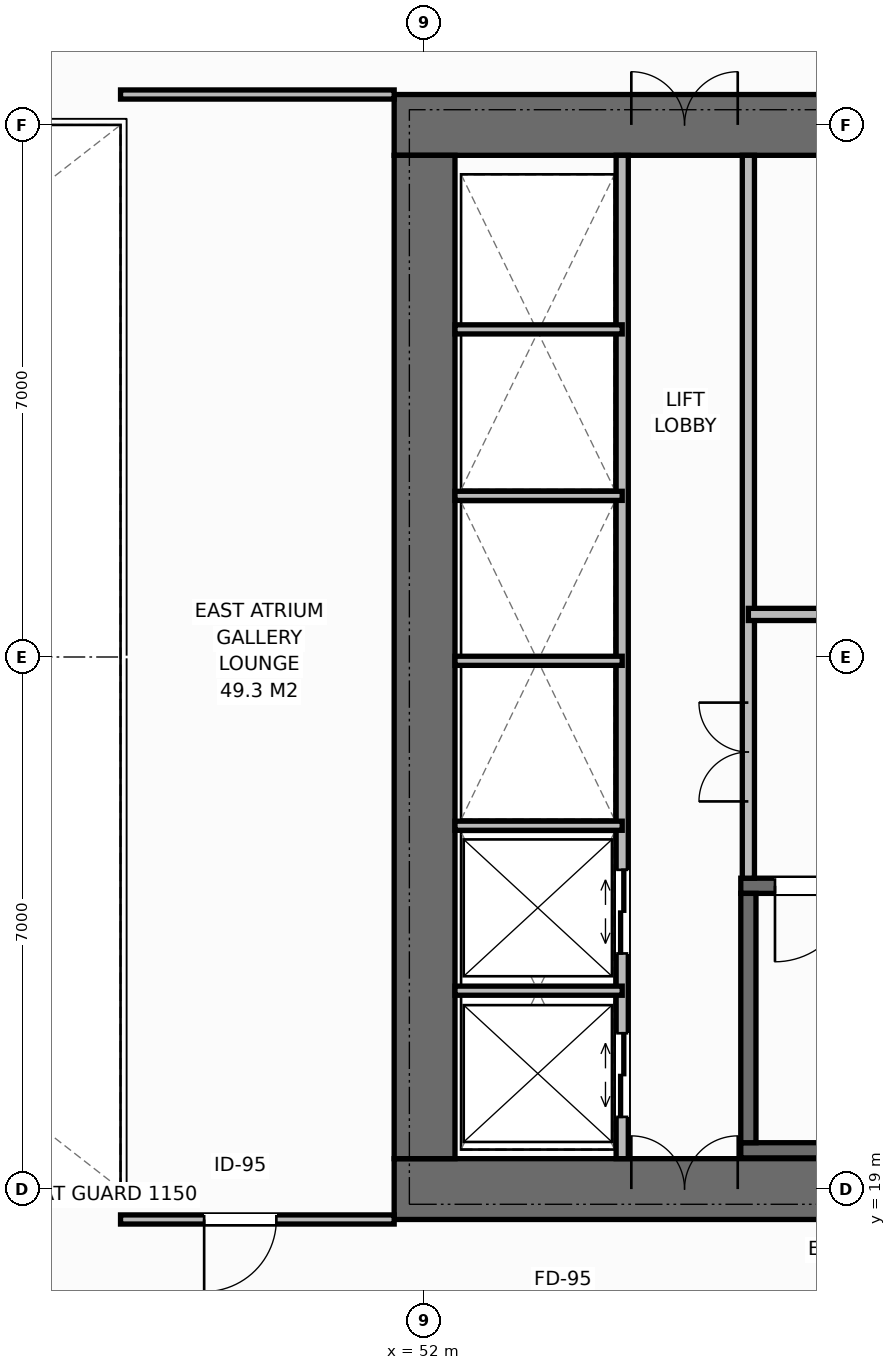
"""IFC4 building model, lengths in metres.
Left out: names, types, materials, properties, quantities, classifications, styles, units other than length and angle.
Written with IfcOpenShell. Run it as: python <this file> out.ifc"""

import sys

from ifc_helpers import new_model, si_unit, direction, frame, frame_2d, origin, place, context, subcontext, project, spatial, rectangle, extrude, element, fill, save


model = new_model("IFC4")
c1 = context("Model", 3, precision=1e-05, world=origin(), true_north=direction((0.0, 1.0)))
c2 = subcontext(c1, "Body", "Model", "MODEL_VIEW")
j1 = project(units=[si_unit("LENGTHUNIT", "METRE"), si_unit("PLANEANGLEUNIT", "RADIAN")], contexts=[c1])
p1 = place(None, origin())
s1 = spatial("IfcSite", under=j1, at=p1, CompositionType="ELEMENT")
p2 = place(p1, origin())
s2 = spatial("IfcBuilding", under=s1, at=p2, CompositionType="ELEMENT")
p3 = place(p2, frame((0.0, 0.0, 35.4)))
s3 = spatial("IfcBuildingStorey", under=s2, at=p3, CompositionType="ELEMENT", Elevation=35.4)
p4 = place(p3, frame((51.6, 19.0, 0.0), z_axis=(0.0, 0.0, 1.0), x_axis=(1.0, 0.0, 0.0)))
e1 = element("IfcWall", 1, at=p4, inside=s3, PredefinedType="SHEAR", context=c2, shape_type="SweptSolid", body=[
    extrude(rectangle(XDim=13.8, YDim=0.8, at=frame_2d((6.9, 0.0))), origin(), (0.0, 0.0, 1.0), 3.8),
])
p5 = place(p4, frame((3.12, 0.0, 0.0)))
e2 = element("IfcOpeningElement", 2, at=p5, cuts=e1, PredefinedType="OPENING", context=c2, shape_type="SweptSolid", body=[
    extrude(rectangle(XDim=1.4, YDim=2.2, at=frame_2d((0.7, 1.1))), frame((0.0, 0.41, 0.0), z_axis=(0.0, -1.0, 0.0), x_axis=(1.0, 0.0, 0.0)), (0.0, 0.0, 1.0), 0.82),
])
p6 = place(p3, frame((51.6, 33.0, 0.0), z_axis=(0.0, 0.0, 1.0), x_axis=(1.0, 0.0, 0.0)))
e3 = element("IfcWall", 3, at=p6, inside=s3, PredefinedType="SHEAR", context=c2, shape_type="SweptSolid", body=[
    extrude(rectangle(XDim=13.8, YDim=0.8, at=frame_2d((6.9, 0.0))), origin(), (0.0, 0.0, 1.0), 3.8),
])
p7 = place(p6, frame((3.12, 0.0, 0.0)))
e4 = element("IfcOpeningElement", 4, at=p7, cuts=e3, PredefinedType="OPENING", context=c2, shape_type="SweptSolid", body=[
    extrude(rectangle(XDim=1.4, YDim=2.2, at=frame_2d((0.7, 1.1))), frame((0.0, 0.41, 0.0), z_axis=(0.0, -1.0, 0.0), x_axis=(1.0, 0.0, 0.0)), (0.0, 0.0, 1.0), 0.82),
])
p8 = place(p6, frame((11.0, 0.0, 0.0)))
e5 = element("IfcOpeningElement", 5, at=p8, cuts=e3, PredefinedType="OPENING", context=c2, shape_type="SweptSolid", body=[
    extrude(rectangle(XDim=0.9, YDim=2.15, at=frame_2d((0.45, 1.075))), frame((0.0, 0.41, 0.0), z_axis=(0.0, -1.0, 0.0), x_axis=(1.0, 0.0, 0.0)), (0.0, 0.0, 1.0), 0.82),
])
p9 = place(p6, frame((5.95, 0.0, 0.0)))
e6 = element("IfcOpeningElement", 6, at=p9, cuts=e3, PredefinedType="OPENING", context=c2, shape_type="SweptSolid", body=[
    extrude(rectangle(XDim=0.9, YDim=2.15, at=frame_2d((0.45, 1.075))), frame((0.0, 0.41, 0.0), z_axis=(0.0, -1.0, 0.0), x_axis=(1.0, 0.0, 0.0)), (0.0, 0.0, 1.0), 0.82),
])
p10 = place(p6, frame((8.35, 0.0, 0.0)))
e7 = element("IfcOpeningElement", 7, at=p10, cuts=e3, PredefinedType="OPENING", context=c2, shape_type="SweptSolid", body=[
    extrude(rectangle(XDim=0.95, YDim=2.15, at=frame_2d((0.475, 1.075))), frame((0.0, 0.41, 0.0), z_axis=(0.0, -1.0, 0.0), x_axis=(1.0, 0.0, 0.0)), (0.0, 0.0, 1.0), 0.82),
])
p11 = place(p3, frame((52.0, 19.4, 0.0), z_axis=(0.0, 0.0, 1.0), x_axis=(0.0, 1.0, 0.0)))
e8 = element("IfcWall", 8, at=p11, inside=s3, PredefinedType="SHEAR", context=c2, shape_type="SweptSolid", body=[
    extrude(rectangle(XDim=13.2, YDim=0.8, at=frame_2d((6.6, 0.0))), origin(), (0.0, 0.0, 1.0), 3.8),
])
p12 = place(p3, frame((56.16, 19.51, 0.0), z_axis=(0.0, 0.0, 1.0), x_axis=(1.0, 0.0, 0.0)))
e9 = element("IfcWall", 9, at=p12, inside=s3, PredefinedType="SHEAR", context=c2, shape_type="SweptSolid", body=[
    extrude(rectangle(XDim=8.43, YDim=0.2, at=frame_2d((4.215, 0.0))), origin(), (0.0, 0.0, 1.0), 3.8),
])
p13 = place(p3, frame((56.16, 22.99, 0.0), z_axis=(0.0, 0.0, 1.0), x_axis=(1.0, 0.0, 0.0)))
e10 = element("IfcWall", 10, at=p13, inside=s3, PredefinedType="SHEAR", context=c2, shape_type="SweptSolid", body=[
    extrude(rectangle(XDim=8.43, YDim=0.2, at=frame_2d((4.215, 0.0))), origin(), (0.0, 0.0, 1.0), 3.8),
])
p14 = place(p13, frame((0.45, 0.0, 0.0)))
e11 = element("IfcOpeningElement", 11, at=p14, cuts=e10, PredefinedType="OPENING", context=c2, shape_type="SweptSolid", body=[
    extrude(rectangle(XDim=1.0, YDim=2.15, at=frame_2d((0.5, 1.075))), frame((0.0, 0.11, 0.0), z_axis=(0.0, -1.0, 0.0), x_axis=(1.0, 0.0, 0.0)), (0.0, 0.0, 1.0), 0.22),
])
p15 = place(p3, frame((56.26, 19.61, 0.0), z_axis=(0.0, 0.0, 1.0), x_axis=(0.0, 1.0, 0.0)))
e12 = element("IfcWall", 12, at=p15, inside=s3, PredefinedType="SHEAR", context=c2, shape_type="SweptSolid", body=[
    extrude(rectangle(XDim=3.28, YDim=0.2, at=frame_2d((1.64, 0.0))), origin(), (0.0, 0.0, 1.0), 3.8),
])
p16 = place(p3, frame((54.6, 19.4, 0.0), z_axis=(0.0, 0.0, 1.0), x_axis=(0.0, 1.0, 0.0)))
e13 = element("IfcWall", 13, at=p16, inside=s3, PredefinedType="STANDARD", context=c2, shape_type="SweptSolid", body=[
    extrude(rectangle(XDim=13.2, YDim=0.16, at=frame_2d((6.6, 0.0))), origin(), (0.0, 0.0, 1.0), 3.55),
])
p17 = place(p16, frame((0.55, 0.0, 0.0)))
e14 = element("IfcOpeningElement", 14, at=p17, cuts=e13, PredefinedType="OPENING", context=c2, shape_type="SweptSolid", body=[
    extrude(rectangle(XDim=1.1, YDim=2.2, at=frame_2d((0.55, 1.1))), frame((0.0, 0.09, 0.0), z_axis=(0.0, -1.0, 0.0), x_axis=(1.0, 0.0, 0.0)), (0.0, 0.0, 1.0), 0.18),
])
p18 = place(p16, frame((2.7, 0.0, 0.0)))
e15 = element("IfcOpeningElement", 15, at=p18, cuts=e13, PredefinedType="OPENING", context=c2, shape_type="SweptSolid", body=[
    extrude(rectangle(XDim=1.1, YDim=2.2, at=frame_2d((0.55, 1.1))), frame((0.0, 0.09, 0.0), z_axis=(0.0, -1.0, 0.0), x_axis=(1.0, 0.0, 0.0)), (0.0, 0.0, 1.0), 0.18),
])
p19 = place(p3, frame((56.26, 23.09, 0.0), z_axis=(0.0, 0.0, 1.0), x_axis=(0.0, 1.0, 0.0)))
e16 = element("IfcWall", 16, at=p19, inside=s3, PredefinedType="STANDARD", context=c2, shape_type="SweptSolid", body=[
    extrude(rectangle(XDim=9.51, YDim=0.16, at=frame_2d((4.755, 0.0))), origin(), (0.0, 0.0, 1.0), 3.55),
])
p20 = place(p19, frame((1.01, 0.0, 0.0)))
e17 = element("IfcOpeningElement", 17, at=p20, cuts=e16, PredefinedType="OPENING", context=c2, shape_type="SweptSolid", body=[
    extrude(rectangle(XDim=1.3, YDim=2.2, at=frame_2d((0.65, 1.1))), frame((0.0, 0.09, 0.0), z_axis=(0.0, -1.0, 0.0), x_axis=(1.0, 0.0, 0.0)), (0.0, 0.0, 1.0), 0.18),
])
for number, where, z_axis, x_axis in (
    (18, (52.4, 21.61, 0.0), (0.0, 0.0, 1.0), (1.0, 0.0, 0.0)),
    (19, (52.4, 23.78, 0.0), (0.0, 0.0, 1.0), (1.0, 0.0, 0.0)),
    (20, (52.4, 25.95, 0.0), (0.0, 0.0, 1.0), (1.0, 0.0, 0.0)),
    (21, (52.4, 28.12, 0.0), (0.0, 0.0, 1.0), (1.0, 0.0, 0.0)),
    (22, (52.4, 30.31, 0.0), (0.0, 0.0, 1.0), (1.0, 0.0, 0.0)),
):
    element("IfcWall", number, at=place(p3, frame(where, z_axis=z_axis, x_axis=x_axis)), inside=s3, PredefinedType="PARTITIONING", context=c2, shape_type="SweptSolid", body=[
        extrude(rectangle(XDim=2.2, YDim=0.12, at=frame_2d((1.1, 0.0))), origin(), (0.0, 0.0, 1.0), 3.55),
    ])
p21 = place(p3, frame((56.26, 26.56, 0.0), z_axis=(0.0, 0.0, 1.0), x_axis=(1.0, 0.0, 0.0)))
e23 = element("IfcWall", 23, at=p21, inside=s3, PredefinedType="STANDARD", context=c2, shape_type="SweptSolid", body=[
    extrude(rectangle(XDim=8.34, YDim=0.16, at=frame_2d((4.17, 0.0))), origin(), (0.0, 0.0, 1.0), 3.55),
])
p22 = place(p3, frame((48.0, 33.4, 0.0), z_axis=(0.0, 0.0, 1.0), x_axis=(1.0, 0.0, 0.0)))
e24 = element("IfcWall", 24, at=p22, inside=s3, PredefinedType="PARTITIONING", context=c2, shape_type="SweptSolid", body=[
    extrude(rectangle(XDim=3.6, YDim=0.12, at=frame_2d((1.8, 0.0))), origin(), (0.0, 0.0, 1.0), 3.55),
])
p23 = place(p3, frame((48.0, 18.6, 0.0), z_axis=(0.0, 0.0, 1.0), x_axis=(1.0, 0.0, 0.0)))
e25 = element("IfcWall", 25, at=p23, inside=s3, PredefinedType="PARTITIONING", context=c2, shape_type="SweptSolid", body=[
    extrude(rectangle(XDim=3.6, YDim=0.12, at=frame_2d((1.8, 0.0))), origin(), (0.0, 0.0, 1.0), 3.55),
])
p24 = place(p23, frame((1.1, 0.0, 0.0)))
e26 = element("IfcOpeningElement", 26, at=p24, cuts=e25, PredefinedType="OPENING", context=c2, shape_type="SweptSolid", body=[
    extrude(rectangle(XDim=0.95, YDim=2.15, at=frame_2d((0.475, 1.075))), frame((0.0, 0.07, 0.0), z_axis=(0.0, -1.0, 0.0), x_axis=(1.0, 0.0, 0.0)), (0.0, 0.0, 1.0), 0.14),
])
p25 = place(p5, origin())
e27 = element("IfcDoor", 27, at=p25, inside=s3, OperationType="DOUBLE_DOOR_SINGLE_SWING", PredefinedType="DOOR", context=c2, shape_type="SweptSolid", body=[
    extrude(rectangle(XDim=1.4, YDim=2.2, at=frame_2d((0.7, 1.1))), frame((0.0, 0.125, 0.0), z_axis=(0.0, -1.0, 0.0), x_axis=(1.0, 0.0, 0.0)), (0.0, 0.0, 1.0), 0.05),
])
fill(e2, e27)
p26 = place(p7, origin())
e28 = element("IfcDoor", 28, at=p26, inside=s3, OperationType="DOUBLE_DOOR_SINGLE_SWING", PredefinedType="DOOR", context=c2, shape_type="SweptSolid", body=[
    extrude(rectangle(XDim=1.4, YDim=2.2, at=frame_2d((0.7, 1.1))), frame((0.0, -0.075, 0.0), z_axis=(0.0, -1.0, 0.0), x_axis=(1.0, 0.0, 0.0)), (0.0, 0.0, 1.0), 0.05),
])
fill(e4, e28)
p27 = place(p17, origin())
e29 = element("IfcDoor", 29, at=p27, inside=s3, OperationType="DOUBLE_DOOR_SLIDING", PredefinedType="DOOR", context=c2, shape_type="SweptSolid", body=[
    extrude(rectangle(XDim=1.1, YDim=2.2, at=frame_2d((0.55, 1.1))), frame((0.0, 0.025, 0.0), z_axis=(0.0, -1.0, 0.0), x_axis=(1.0, 0.0, 0.0)), (0.0, 0.0, 1.0), 0.05),
])
fill(e14, e29)
p28 = place(p18, origin())
e30 = element("IfcDoor", 30, at=p28, inside=s3, OperationType="DOUBLE_DOOR_SLIDING", PredefinedType="DOOR", context=c2, shape_type="SweptSolid", body=[
    extrude(rectangle(XDim=1.1, YDim=2.2, at=frame_2d((0.55, 1.1))), frame((0.0, 0.025, 0.0), z_axis=(0.0, -1.0, 0.0), x_axis=(1.0, 0.0, 0.0)), (0.0, 0.0, 1.0), 0.05),
])
fill(e15, e30)
p29 = place(p14, origin())
e31 = element("IfcDoor", 31, at=p29, inside=s3, OperationType="SINGLE_SWING_RIGHT", PredefinedType="DOOR", context=c2, shape_type="SweptSolid", body=[
    extrude(rectangle(XDim=1.0, YDim=2.15, at=frame_2d((0.5, 1.075))), frame((0.0, 0.025, 0.0), z_axis=(0.0, -1.0, 0.0), x_axis=(1.0, 0.0, 0.0)), (0.0, 0.0, 1.0), 0.05),
])
fill(e11, e31)
p30 = place(p20, origin())
e32 = element("IfcDoor", 32, at=p30, inside=s3, OperationType="DOUBLE_DOOR_SINGLE_SWING", PredefinedType="DOOR", context=c2, shape_type="SweptSolid", body=[
    extrude(rectangle(XDim=1.3, YDim=2.2, at=frame_2d((0.65, 1.1))), frame((0.0, 0.025, 0.0), z_axis=(0.0, -1.0, 0.0), x_axis=(1.0, 0.0, 0.0)), (0.0, 0.0, 1.0), 0.05),
])
fill(e17, e32)
p31 = place(p24, origin())
e33 = element("IfcDoor", 33, at=p31, inside=s3, OperationType="SINGLE_SWING_RIGHT", PredefinedType="DOOR", context=c2, shape_type="SweptSolid", body=[
    extrude(rectangle(XDim=0.95, YDim=2.15, at=frame_2d((0.475, 1.075))), frame((0.0, 0.025, 0.0), z_axis=(0.0, -1.0, 0.0), x_axis=(1.0, 0.0, 0.0)), (0.0, 0.0, 1.0), 0.05),
])
fill(e26, e33)
save(model, sys.argv[1])
